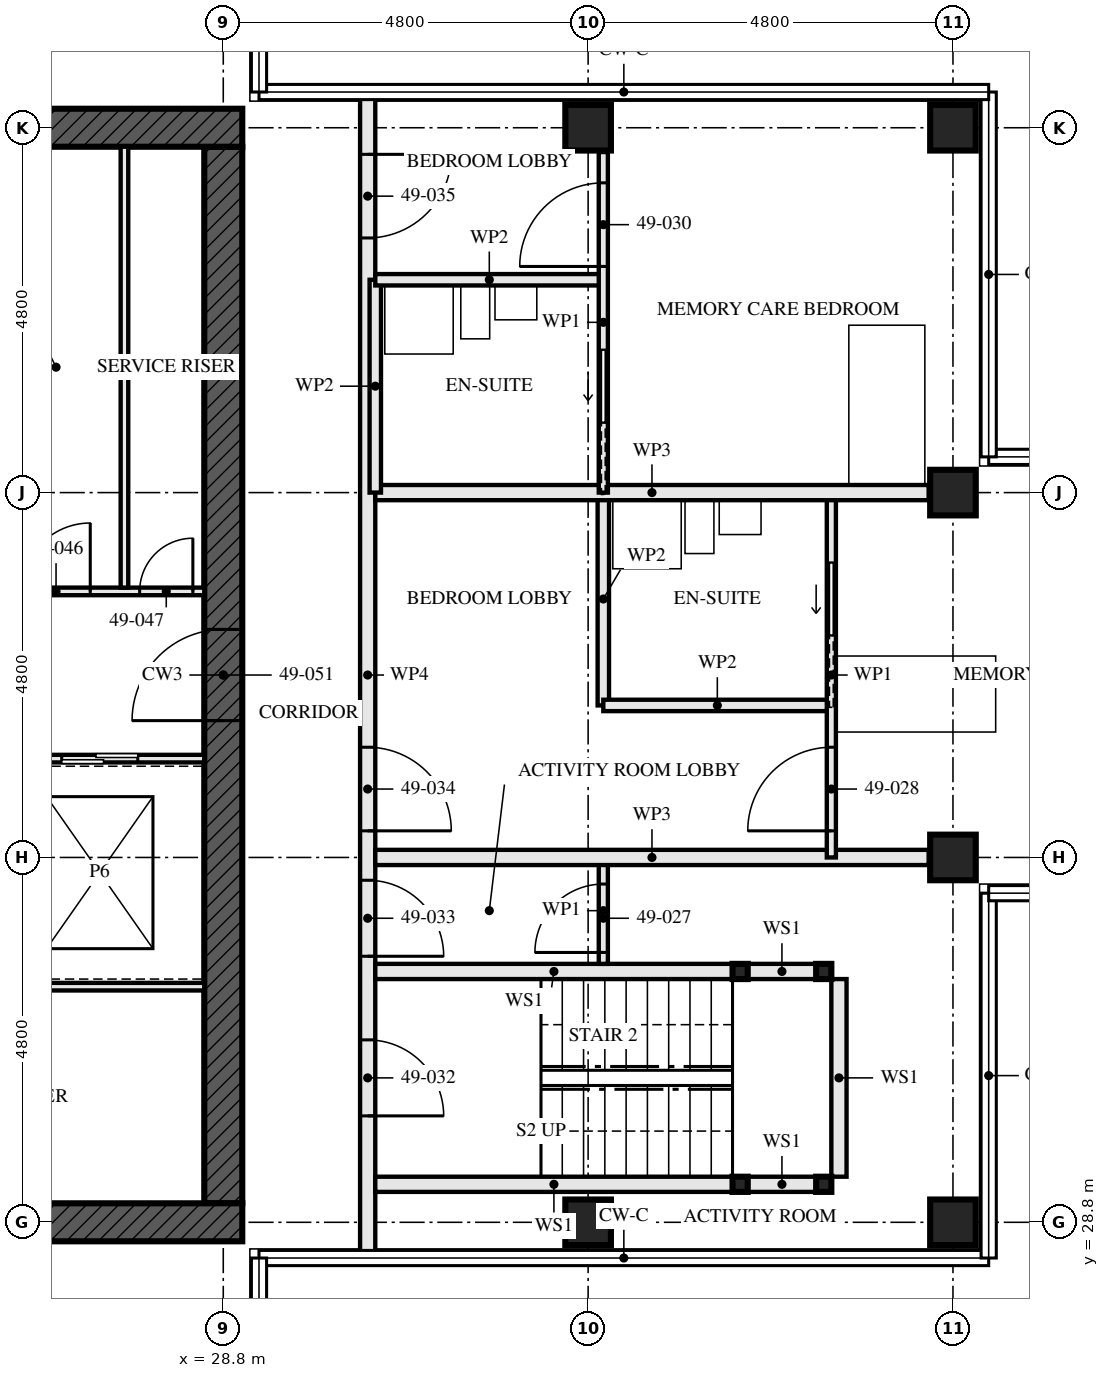
"""IFC4 building model, lengths in metres.
Left out: names, types, materials, properties, quantities, classifications, styles, units other than length and angle.
Written with IfcOpenShell. Run it as: python <this file> out.ifc"""

import sys

from ifc_helpers import new_model, si_unit, direction, frame, frame_2d, origin, origin_2d, place, context, subcontext, project, spatial, rectangle, hollow_rectangle, extrude, element, fill, save


model = new_model("IFC4")
c1 = context("Model", 3, precision=1e-05, world=origin(), true_north=direction((0.0, 1.0)))
c2 = subcontext(c1, "Body", "Model", "MODEL_VIEW")
j1 = project(units=[si_unit("LENGTHUNIT", "METRE"), si_unit("PLANEANGLEUNIT", "RADIAN")], contexts=[c1])
p1 = place(None, origin())
s1 = spatial("IfcSite", under=j1, at=p1, CompositionType="ELEMENT")
p2 = place(p1, origin())
s2 = spatial("IfcBuilding", under=s1, at=p2, CompositionType="ELEMENT")
p3 = place(p2, frame((0.0, 0.0, 179.5)))
s3 = spatial("IfcBuildingStorey", under=s2, at=p3, CompositionType="ELEMENT", Elevation=179.5)
for number, where, z_axis, x_axis in (
    (1, (33.6, 28.8, 0.0), (0.0, 0.0, 1.0), (0.0, 1.0, 0.0)),
    (2, (33.6, 43.2, 0.0), (0.0, 0.0, 1.0), (0.0, 1.0, 0.0)),
    (3, (38.4, 28.8, 0.0), (0.0, 0.0, 1.0), (0.0, 1.0, 0.0)),
    (4, (38.4, 33.6, 0.0), (0.0, 0.0, 1.0), (0.0, 1.0, 0.0)),
    (5, (38.4, 38.4, 0.0), (0.0, 0.0, 1.0), (0.0, 1.0, 0.0)),
    (6, (38.4, 43.2, 0.0), (0.0, 0.0, 1.0), (0.0, 1.0, 0.0)),
):
    element("IfcColumn", number, at=place(p3, frame(where, z_axis=z_axis, x_axis=x_axis)), inside=s3, PredefinedType="COLUMN", context=c2, shape_type="SweptSolid", body=[
        extrude(hollow_rectangle(XDim=0.6, YDim=0.6, WallThickness=0.08, at=origin_2d()), origin(), (0.0, 0.0, 1.0), 3.5),
    ])
p4 = place(p3, frame((14.15, 28.8, -0.17), z_axis=(0.0, 0.0, 1.0), x_axis=(1.0, 0.0, 0.0)))
e7 = element("IfcWall", 7, at=p4, inside=s3, PredefinedType="SHEAR", context=c2, shape_type="SweptSolid", body=[
    extrude(rectangle(XDim=14.9, YDim=0.5, at=frame_2d((7.45, 0.0))), origin(), (0.0, 0.0, 1.0), 3.5),
])
p5 = place(p4, frame((6.85, 0.0, 0.17)))
e8 = element("IfcOpeningElement", 8, at=p5, cuts=e7, PredefinedType="OPENING", context=c2, shape_type="SweptSolid", body=[
    extrude(rectangle(XDim=1.2, YDim=2.1, at=frame_2d((0.6, 1.05))), frame((0.0, 0.26, 0.0), z_axis=(0.0, -1.0, 0.0), x_axis=(1.0, 0.0, 0.0)), (0.0, 0.0, 1.0), 0.521),
])
p6 = place(p3, frame((29.05, 43.2, -0.17), z_axis=(0.0, 0.0, 1.0), x_axis=(-1.0, 0.0, 0.0)))
e9 = element("IfcWall", 9, at=p6, inside=s3, PredefinedType="SHEAR", context=c2, shape_type="SweptSolid", body=[
    extrude(rectangle(XDim=14.9, YDim=0.5, at=frame_2d((7.45, 0.0))), origin(), (0.0, 0.0, 1.0), 3.5),
])
p7 = place(p6, frame((6.85, 0.0, 0.17)))
e10 = element("IfcOpeningElement", 10, at=p7, cuts=e9, PredefinedType="OPENING", context=c2, shape_type="SweptSolid", body=[
    extrude(rectangle(XDim=1.2, YDim=2.1, at=frame_2d((0.6, 1.05))), frame((0.0, 0.26, 0.0), z_axis=(0.0, -1.0, 0.0), x_axis=(1.0, 0.0, 0.0)), (0.0, 0.0, 1.0), 0.521),
])
p8 = place(p3, frame((28.8, 29.05, -0.17), z_axis=(0.0, 0.0, 1.0), x_axis=(0.0, 1.0, 0.0)))
e11 = element("IfcWall", 11, at=p8, inside=s3, PredefinedType="SHEAR", context=c2, shape_type="SweptSolid", body=[
    extrude(rectangle(XDim=13.9, YDim=0.5, at=frame_2d((6.95, 0.0))), origin(), (0.0, 0.0, 1.0), 3.5),
])
p9 = place(p8, frame((6.35, 0.0, 0.17)))
e12 = element("IfcOpeningElement", 12, at=p9, cuts=e11, PredefinedType="OPENING", context=c2, shape_type="SweptSolid", body=[
    extrude(rectangle(XDim=1.2, YDim=2.1, at=frame_2d((0.6, 1.05))), frame((0.0, 0.26, 0.0), z_axis=(0.0, -1.0, 0.0), x_axis=(1.0, 0.0, 0.0)), (0.0, 0.0, 1.0), 0.521),
])
for number, where, z_axis, x_axis in (
    (13, (36.7, 29.3, 0.0), (0.0, 0.0, 1.0), (1.0, 0.0, 0.0)),
    (14, (36.7, 32.1, 0.0), (0.0, 0.0, 1.0), (1.0, 0.0, 0.0)),
    (15, (35.6, 29.3, 0.0), (0.0, 0.0, 1.0), (1.0, 0.0, 0.0)),
    (16, (35.6, 32.1, 0.0), (0.0, 0.0, 1.0), (1.0, 0.0, 0.0)),
):
    element("IfcColumn", number, at=place(p3, frame(where, z_axis=z_axis, x_axis=x_axis)), inside=s3, PredefinedType="COLUMN", context=c2, shape_type="SweptSolid", body=[
        extrude(hollow_rectangle(XDim=0.2, YDim=0.2, WallThickness=0.008, at=origin_2d()), origin(), (0.0, 0.0, 1.0), 3.33),
    ])
p10 = place(p3, frame((36.6, 29.3, 0.0), z_axis=(0.0, 0.0, 1.0), x_axis=(-1.0, 0.0, 0.0)))
e17 = element("IfcWall", 17, at=p10, inside=s3, PredefinedType="SOLIDWALL", context=c2, shape_type="SweptSolid", body=[
    extrude(rectangle(XDim=0.9, YDim=0.2, at=frame_2d((0.45, 0.0))), origin(), (0.0, 0.0, 1.0), 2.99),
])
p11 = place(p3, frame((35.5, 29.3, 0.0), z_axis=(0.0, 0.0, 1.0), x_axis=(-1.0, 0.0, 0.0)))
e18 = element("IfcWall", 18, at=p11, inside=s3, PredefinedType="SOLIDWALL", context=c2, shape_type="SweptSolid", body=[
    extrude(rectangle(XDim=4.7, YDim=0.2, at=frame_2d((2.35, 0.0))), origin(), (0.0, 0.0, 1.0), 2.99),
])
p12 = place(p3, frame((36.6, 32.1, 0.0), z_axis=(0.0, 0.0, 1.0), x_axis=(-1.0, 0.0, 0.0)))
e19 = element("IfcWall", 19, at=p12, inside=s3, PredefinedType="SOLIDWALL", context=c2, shape_type="SweptSolid", body=[
    extrude(rectangle(XDim=0.9, YDim=0.2, at=frame_2d((0.45, 0.0))), origin(), (0.0, 0.0, 1.0), 2.99),
])
p13 = place(p3, frame((35.5, 32.1, 0.0), z_axis=(0.0, 0.0, 1.0), x_axis=(-1.0, 0.0, 0.0)))
e20 = element("IfcWall", 20, at=p13, inside=s3, PredefinedType="SOLIDWALL", context=c2, shape_type="SweptSolid", body=[
    extrude(rectangle(XDim=4.7, YDim=0.2, at=frame_2d((2.35, 0.0))), origin(), (0.0, 0.0, 1.0), 2.99),
])
p14 = place(p3, frame((36.9, 29.4, 0.0), z_axis=(0.0, 0.0, 1.0), x_axis=(0.0, 1.0, 0.0)))
e21 = element("IfcWall", 21, at=p14, inside=s3, PredefinedType="SOLIDWALL", context=c2, shape_type="SweptSolid", body=[
    extrude(rectangle(XDim=2.6, YDim=0.2, at=frame_2d((1.3, 0.0))), origin(), (0.0, 0.0, 1.0), 3.33),
])
p15 = place(p3, frame((33.8, 32.2, 0.0), z_axis=(0.0, 0.0, 1.0), x_axis=(0.0, 1.0, 0.0)))
e22 = element("IfcWall", 22, at=p15, inside=s3, PredefinedType="PARTITIONING", context=c2, shape_type="SweptSolid", body=[
    extrude(rectangle(XDim=1.4, YDim=0.12, at=frame_2d((0.7, 0.0))), origin(), (0.0, 0.0, 1.0), 3.33),
])
p16 = place(p15, frame((0.15, 0.0, 0.0)))
e23 = element("IfcOpeningElement", 23, at=p16, cuts=e22, PredefinedType="OPENING", context=c2, shape_type="SweptSolid", body=[
    extrude(rectangle(XDim=0.9, YDim=2.1, at=frame_2d((0.45, 1.05))), frame((0.0, 0.071, 0.0), z_axis=(0.0, -1.0, 0.0), x_axis=(1.0, 0.0, 0.0)), (0.0, 0.0, 1.0), 0.141),
])
p17 = place(p3, frame((38.08, 33.6, 0.0), z_axis=(0.0, 0.0, 1.0), x_axis=(-1.0, 0.0, 0.0)))
e24 = element("IfcWall", 24, at=p17, inside=s3, PredefinedType="PARTITIONING", context=c2, shape_type="SweptSolid", body=[
    extrude(rectangle(XDim=7.28, YDim=0.2, at=frame_2d((3.64, 0.0))), origin(), (0.0, 0.0, 1.0), 2.55),
])
p18 = place(p3, frame((36.8, 35.6, 0.0), z_axis=(0.0, 0.0, 1.0), x_axis=(-1.0, 0.0, 0.0)))
e25 = element("IfcWall", 25, at=p18, inside=s3, PredefinedType="PARTITIONING", context=c2, shape_type="SweptSolid", body=[
    extrude(rectangle(XDim=3.0, YDim=0.15, at=frame_2d((1.5, 0.0))), origin(), (0.0, 0.0, 1.0), 3.33),
])
p19 = place(p3, frame((33.8, 35.6, 0.0), z_axis=(0.0, 0.0, 1.0), x_axis=(0.0, 1.0, 0.0)))
e26 = element("IfcWall", 26, at=p19, inside=s3, PredefinedType="PARTITIONING", context=c2, shape_type="SweptSolid", body=[
    extrude(rectangle(XDim=2.8, YDim=0.15, at=frame_2d((1.4, 0.0))), origin(), (0.0, 0.0, 1.0), 3.33),
])
p20 = place(p3, frame((36.8, 33.6, 0.0), z_axis=(0.0, 0.0, 1.0), x_axis=(0.0, 1.0, 0.0)))
e27 = element("IfcWall", 27, at=p20, inside=s3, PredefinedType="PARTITIONING", context=c2, shape_type="SweptSolid", body=[
    extrude(rectangle(XDim=4.8, YDim=0.12, at=frame_2d((2.4, 0.0))), origin(), (0.0, 0.0, 1.0), 3.33),
])
p21 = place(p20, frame((0.35, 0.0, 0.0)))
e28 = element("IfcOpeningElement", 28, at=p21, cuts=e27, PredefinedType="OPENING", context=c2, shape_type="SweptSolid", body=[
    extrude(rectangle(XDim=1.1, YDim=2.1, at=frame_2d((0.55, 1.05))), frame((0.0, 0.071, 0.0), z_axis=(0.0, -1.0, 0.0), x_axis=(1.0, 0.0, 0.0)), (0.0, 0.0, 1.0), 0.141),
])
p22 = place(p20, frame((2.925, 0.0, 0.0)))
e29 = element("IfcOpeningElement", 29, at=p22, cuts=e27, PredefinedType="OPENING", context=c2, shape_type="SweptSolid", body=[
    extrude(rectangle(XDim=0.95, YDim=2.1, at=frame_2d((0.475, 1.05))), frame((0.0, 0.071, 0.0), z_axis=(0.0, -1.0, 0.0), x_axis=(1.0, 0.0, 0.0)), (0.0, 0.0, 1.0), 0.141),
])
p23 = place(p3, frame((38.08, 38.4, 0.0), z_axis=(0.0, 0.0, 1.0), x_axis=(-1.0, 0.0, 0.0)))
e30 = element("IfcWall", 30, at=p23, inside=s3, PredefinedType="PARTITIONING", context=c2, shape_type="SweptSolid", body=[
    extrude(rectangle(XDim=7.28, YDim=0.2, at=frame_2d((3.64, 0.0))), origin(), (0.0, 0.0, 1.0), 2.55),
])
p24 = place(p3, frame((33.8, 41.2, 0.0), z_axis=(0.0, 0.0, 1.0), x_axis=(-1.0, 0.0, 0.0)))
e31 = element("IfcWall", 31, at=p24, inside=s3, PredefinedType="PARTITIONING", context=c2, shape_type="SweptSolid", body=[
    extrude(rectangle(XDim=3.0, YDim=0.15, at=frame_2d((1.5, 0.0))), origin(), (0.0, 0.0, 1.0), 3.33),
])
p25 = place(p3, frame((30.8, 38.4, 0.0), z_axis=(0.0, 0.0, 1.0), x_axis=(0.0, 1.0, 0.0)))
e32 = element("IfcWall", 32, at=p25, inside=s3, PredefinedType="PARTITIONING", context=c2, shape_type="SweptSolid", body=[
    extrude(rectangle(XDim=2.8, YDim=0.15, at=frame_2d((1.4, 0.0))), origin(), (0.0, 0.0, 1.0), 3.33),
])
p26 = place(p3, frame((33.8, 38.4, 0.0), z_axis=(0.0, 0.0, 1.0), x_axis=(0.0, 1.0, 0.0)))
e33 = element("IfcWall", 33, at=p26, inside=s3, PredefinedType="PARTITIONING", context=c2, shape_type="SweptSolid", body=[
    extrude(rectangle(XDim=4.48, YDim=0.12, at=frame_2d((2.24, 0.0))), origin(), (0.0, 0.0, 1.0), 3.33),
])
p27 = place(p26, frame((2.975, 0.0, 0.0)))
e34 = element("IfcOpeningElement", 34, at=p27, cuts=e33, PredefinedType="OPENING", context=c2, shape_type="SweptSolid", body=[
    extrude(rectangle(XDim=1.1, YDim=2.1, at=frame_2d((0.55, 1.05))), frame((0.0, 0.071, 0.0), z_axis=(0.0, -1.0, 0.0), x_axis=(1.0, 0.0, 0.0)), (0.0, 0.0, 1.0), 0.141),
])
p28 = place(p26, frame((0.925, 0.0, 0.0)))
e35 = element("IfcOpeningElement", 35, at=p28, cuts=e33, PredefinedType="OPENING", context=c2, shape_type="SweptSolid", body=[
    extrude(rectangle(XDim=0.95, YDim=2.1, at=frame_2d((0.475, 1.05))), frame((0.0, 0.071, 0.0), z_axis=(0.0, -1.0, 0.0), x_axis=(1.0, 0.0, 0.0)), (0.0, 0.0, 1.0), 0.141),
])
p29 = place(p3, frame((30.7, 28.35, 0.0), z_axis=(0.0, 0.0, 1.0), x_axis=(0.0, 1.0, 0.0)))
e36 = element("IfcWall", 36, at=p29, inside=s3, PredefinedType="PARTITIONING", context=c2, shape_type="SweptSolid", body=[
    extrude(rectangle(XDim=15.3, YDim=0.2, at=frame_2d((7.65, 0.0))), origin(), (0.0, 0.0, 1.0), 2.32),
])
p30 = place(p29, frame((1.85, 0.0, 0.0)))
e37 = element("IfcOpeningElement", 37, at=p30, cuts=e36, PredefinedType="OPENING", context=c2, shape_type="SweptSolid", body=[
    extrude(rectangle(XDim=1.0, YDim=2.1, at=frame_2d((0.5, 1.05))), frame((0.0, 0.111, 0.0), z_axis=(0.0, -1.0, 0.0), x_axis=(1.0, 0.0, 0.0)), (0.0, 0.0, 1.0), 0.221),
])
p31 = place(p29, frame((3.95, 0.0, 0.0)))
e38 = element("IfcOpeningElement", 38, at=p31, cuts=e36, PredefinedType="OPENING", context=c2, shape_type="SweptSolid", body=[
    extrude(rectangle(XDim=1.0, YDim=2.1, at=frame_2d((0.5, 1.05))), frame((0.0, 0.111, 0.0), z_axis=(0.0, -1.0, 0.0), x_axis=(1.0, 0.0, 0.0)), (0.0, 0.0, 1.0), 0.221),
])
p32 = place(p29, frame((5.6, 0.0, 0.0)))
e39 = element("IfcOpeningElement", 39, at=p32, cuts=e36, PredefinedType="OPENING", context=c2, shape_type="SweptSolid", body=[
    extrude(rectangle(XDim=1.1, YDim=2.1, at=frame_2d((0.55, 1.05))), frame((0.0, 0.111, 0.0), z_axis=(0.0, -1.0, 0.0), x_axis=(1.0, 0.0, 0.0)), (0.0, 0.0, 1.0), 0.221),
])
p33 = place(p29, frame((13.4, 0.0, 0.0)))
e40 = element("IfcOpeningElement", 40, at=p33, cuts=e36, PredefinedType="OPENING", context=c2, shape_type="SweptSolid", body=[
    extrude(rectangle(XDim=1.1, YDim=2.1, at=frame_2d((0.55, 1.05))), frame((0.0, 0.111, 0.0), z_axis=(0.0, -1.0, 0.0), x_axis=(1.0, 0.0, 0.0)), (0.0, 0.0, 1.0), 0.221),
])
p34 = place(p3, frame((27.5, 37.15, 0.0), z_axis=(0.0, 0.0, 1.0), x_axis=(0.0, 1.0, 0.0)))
e41 = element("IfcWall", 41, at=p34, inside=s3, PredefinedType="SOLIDWALL", context=c2, shape_type="SweptSolid", body=[
    extrude(rectangle(XDim=5.8, YDim=0.1, at=frame_2d((2.9, 0.0))), origin(), (0.0, 0.0, 1.0), 3.33),
])
p35 = place(p3, frame((23.05, 34.9, 0.0), z_axis=(0.0, 0.0, 1.0), x_axis=(1.0, 0.0, 0.0)))
e42 = element("IfcWall", 42, at=p35, inside=s3, PredefinedType="SOLIDWALL", context=c2, shape_type="SweptSolid", body=[
    extrude(rectangle(XDim=5.5, YDim=0.1, at=frame_2d((2.75, 0.0))), origin(), (0.0, 0.0, 1.0), 3.33),
])
p36 = place(p35, frame((0.85, 0.0, 0.0)))
e43 = element("IfcOpeningElement", 43, at=p36, cuts=e42, PredefinedType="OPENING", context=c2, shape_type="SweptSolid", body=[
    extrude(rectangle(XDim=1.0, YDim=2.1, at=frame_2d((0.5, 1.05))), frame((0.0, 0.061, 0.0), z_axis=(0.0, -1.0, 0.0), x_axis=(1.0, 0.0, 0.0)), (0.0, 0.0, 1.0), 0.121),
])
p37 = place(p35, frame((3.625, 0.0, 0.0)))
e44 = element("IfcOpeningElement", 44, at=p37, cuts=e42, PredefinedType="OPENING", context=c2, shape_type="SweptSolid", body=[
    extrude(rectangle(XDim=1.0, YDim=2.1, at=frame_2d((0.5, 1.05))), frame((0.0, 0.061, 0.0), z_axis=(0.0, -1.0, 0.0), x_axis=(1.0, 0.0, 0.0)), (0.0, 0.0, 1.0), 0.121),
])
p38 = place(p3, frame((22.65, 37.1, 0.0), z_axis=(0.0, 0.0, 1.0), x_axis=(1.0, 0.0, 0.0)))
e45 = element("IfcWall", 45, at=p38, inside=s3, PredefinedType="SOLIDWALL", context=c2, shape_type="SweptSolid", body=[
    extrude(rectangle(XDim=5.9, YDim=0.1, at=frame_2d((2.95, 0.0))), origin(), (0.0, 0.0, 1.0), 3.33),
])
p39 = place(p38, frame((3.5, 0.0, 0.0)))
e46 = element("IfcOpeningElement", 46, at=p39, cuts=e45, PredefinedType="OPENING", context=c2, shape_type="SweptSolid", body=[
    extrude(rectangle(XDim=0.9, YDim=2.1, at=frame_2d((0.45, 1.05))), frame((0.0, 0.061, 0.0), z_axis=(0.0, -1.0, 0.0), x_axis=(1.0, 0.0, 0.0)), (0.0, 0.0, 1.0), 0.121),
])
p40 = place(p38, frame((5.05, 0.0, 0.0)))
e47 = element("IfcOpeningElement", 47, at=p40, cuts=e45, PredefinedType="OPENING", context=c2, shape_type="SweptSolid", body=[
    extrude(rectangle(XDim=0.7, YDim=2.1, at=frame_2d((0.35, 1.05))), frame((0.0, 0.061, 0.0), z_axis=(0.0, -1.0, 0.0), x_axis=(1.0, 0.0, 0.0)), (0.0, 0.0, 1.0), 0.121),
])
p41 = place(p3, frame((23.15, 31.9, 0.0), z_axis=(0.0, 0.0, 1.0), x_axis=(1.0, 0.0, 0.0)))
e48 = element("IfcWall", 48, at=p41, inside=s3, PredefinedType="SOLIDWALL", context=c2, shape_type="SweptSolid", body=[
    extrude(rectangle(XDim=5.4, YDim=0.1, at=frame_2d((2.7, 0.0))), origin(), (0.0, 0.0, 1.0), 3.33),
])
p42 = place(p16, origin())
e49 = element("IfcDoor", 49, at=p42, inside=s3, OperationType="SINGLE_SWING_RIGHT", PredefinedType="DOOR", context=c2, shape_type="SweptSolid", body=[
    extrude(rectangle(XDim=0.9, YDim=2.1, at=frame_2d((0.45, 1.05))), frame((0.0, 0.022, 0.0), z_axis=(0.0, -1.0, 0.0), x_axis=(1.0, 0.0, 0.0)), (0.0, 0.0, 1.0), 0.044),
])
fill(e23, e49)
p43 = place(p21, origin())
e50 = element("IfcDoor", 50, at=p43, inside=s3, OperationType="SINGLE_SWING_RIGHT", PredefinedType="DOOR", context=c2, shape_type="SweptSolid", body=[
    extrude(rectangle(XDim=1.1, YDim=2.1, at=frame_2d((0.55, 1.05))), frame((0.0, 0.022, 0.0), z_axis=(0.0, -1.0, 0.0), x_axis=(1.0, 0.0, 0.0)), (0.0, 0.0, 1.0), 0.044),
])
fill(e28, e50)
p44 = place(p22, origin())
e51 = element("IfcDoor", 51, at=p44, inside=s3, OperationType="SLIDING_TO_RIGHT", PredefinedType="DOOR", context=c2, shape_type="SweptSolid", body=[
    extrude(rectangle(XDim=0.95, YDim=2.1, at=frame_2d((0.475, 1.05))), frame((0.0, 0.022, 0.0), z_axis=(0.0, -1.0, 0.0), x_axis=(1.0, 0.0, 0.0)), (0.0, 0.0, 1.0), 0.044),
])
fill(e29, e51)
p45 = place(p27, origin())
e52 = element("IfcDoor", 52, at=p45, inside=s3, OperationType="SINGLE_SWING_RIGHT", PredefinedType="DOOR", context=c2, shape_type="SweptSolid", body=[
    extrude(rectangle(XDim=1.1, YDim=2.1, at=frame_2d((0.55, 1.05))), frame((0.0, 0.022, 0.0), z_axis=(0.0, -1.0, 0.0), x_axis=(1.0, 0.0, 0.0)), (0.0, 0.0, 1.0), 0.044),
])
fill(e34, e52)
p46 = place(p28, origin())
e53 = element("IfcDoor", 53, at=p46, inside=s3, OperationType="SLIDING_TO_RIGHT", PredefinedType="DOOR", context=c2, shape_type="SweptSolid", body=[
    extrude(rectangle(XDim=0.95, YDim=2.1, at=frame_2d((0.475, 1.05))), frame((0.0, 0.022, 0.0), z_axis=(0.0, -1.0, 0.0), x_axis=(1.0, 0.0, 0.0)), (0.0, 0.0, 1.0), 0.044),
])
fill(e35, e53)
p47 = place(p30, frame((1.0, 0.0, 0.0), z_axis=(0.0, 0.0, 1.0), x_axis=(-1.0, 0.0, 0.0)))
e54 = element("IfcDoor", 54, at=p47, inside=s3, OperationType="SINGLE_SWING_LEFT", PredefinedType="DOOR", context=c2, shape_type="SweptSolid", body=[
    extrude(rectangle(XDim=1.0, YDim=2.1, at=frame_2d((0.5, 1.05))), frame((0.0, 0.032, 0.0), z_axis=(0.0, -1.0, 0.0), x_axis=(1.0, 0.0, 0.0)), (0.0, 0.0, 1.0), 0.064),
])
fill(e37, e54)
p48 = place(p31, frame((1.0, 0.0, 0.0), z_axis=(0.0, 0.0, 1.0), x_axis=(-1.0, 0.0, 0.0)))
e55 = element("IfcDoor", 55, at=p48, inside=s3, OperationType="SINGLE_SWING_LEFT", PredefinedType="DOOR", context=c2, shape_type="SweptSolid", body=[
    extrude(rectangle(XDim=1.0, YDim=2.1, at=frame_2d((0.5, 1.05))), frame((0.0, 0.027, 0.0), z_axis=(0.0, -1.0, 0.0), x_axis=(1.0, 0.0, 0.0)), (0.0, 0.0, 1.0), 0.054),
])
fill(e38, e55)
p49 = place(p32, frame((1.1, 0.0, 0.0), z_axis=(0.0, 0.0, 1.0), x_axis=(-1.0, 0.0, 0.0)))
e56 = element("IfcDoor", 56, at=p49, inside=s3, OperationType="SINGLE_SWING_LEFT", PredefinedType="DOOR", context=c2, shape_type="SweptSolid", body=[
    extrude(rectangle(XDim=1.1, YDim=2.1, at=frame_2d((0.55, 1.05))), frame((0.0, 0.027, 0.0), z_axis=(0.0, -1.0, 0.0), x_axis=(1.0, 0.0, 0.0)), (0.0, 0.0, 1.0), 0.054),
])
fill(e39, e56)
p50 = place(p33, frame((1.1, 0.0, 0.0), z_axis=(0.0, 0.0, 1.0), x_axis=(-1.0, 0.0, 0.0)))
e57 = element("IfcDoor", 57, at=p50, inside=s3, OperationType="SINGLE_SWING_RIGHT", PredefinedType="DOOR", context=c2, shape_type="SweptSolid", body=[
    extrude(rectangle(XDim=1.1, YDim=2.1, at=frame_2d((0.55, 1.05))), frame((0.0, 0.027, 0.0), z_axis=(0.0, -1.0, 0.0), x_axis=(1.0, 0.0, 0.0)), (0.0, 0.0, 1.0), 0.054),
])
fill(e40, e57)
p51 = place(p37, origin())
e58 = element("IfcDoor", 58, at=p51, inside=s3, OperationType="SLIDING_TO_LEFT", PredefinedType="DOOR", context=c2, shape_type="SweptSolid", body=[
    extrude(rectangle(XDim=1.0, YDim=2.1, at=frame_2d((0.5, 1.05))), frame((0.0, 0.05, 0.0), z_axis=(0.0, -1.0, 0.0), x_axis=(1.0, 0.0, 0.0)), (0.0, 0.0, 1.0), 0.1),
])
fill(e44, e58)
p52 = place(p39, origin())
e59 = element("IfcDoor", 59, at=p52, inside=s3, OperationType="SINGLE_SWING_LEFT", PredefinedType="DOOR", context=c2, shape_type="SweptSolid", body=[
    extrude(rectangle(XDim=0.9, YDim=2.1, at=frame_2d((0.45, 1.05))), frame((0.0, 0.027, 0.0), z_axis=(0.0, -1.0, 0.0), x_axis=(1.0, 0.0, 0.0)), (0.0, 0.0, 1.0), 0.054),
])
fill(e46, e59)
p53 = place(p40, origin())
e60 = element("IfcDoor", 60, at=p53, inside=s3, OperationType="SINGLE_SWING_LEFT", PredefinedType="DOOR", context=c2, shape_type="SweptSolid", body=[
    extrude(rectangle(XDim=0.7, YDim=2.1, at=frame_2d((0.35, 1.05))), frame((0.0, 0.027, 0.0), z_axis=(0.0, -1.0, 0.0), x_axis=(1.0, 0.0, 0.0)), (0.0, 0.0, 1.0), 0.054),
])
fill(e47, e60)
p54 = place(p9, origin())
e61 = element("IfcDoor", 61, at=p54, inside=s3, OperationType="SINGLE_SWING_LEFT", PredefinedType="DOOR", context=c2, shape_type="SweptSolid", body=[
    extrude(rectangle(XDim=1.2, YDim=2.1, at=frame_2d((0.6, 1.05))), frame((0.0, 0.027, 0.0), z_axis=(0.0, -1.0, 0.0), x_axis=(1.0, 0.0, 0.0)), (0.0, 0.0, 1.0), 0.054),
])
fill(e12, e61)
save(model, sys.argv[1])
